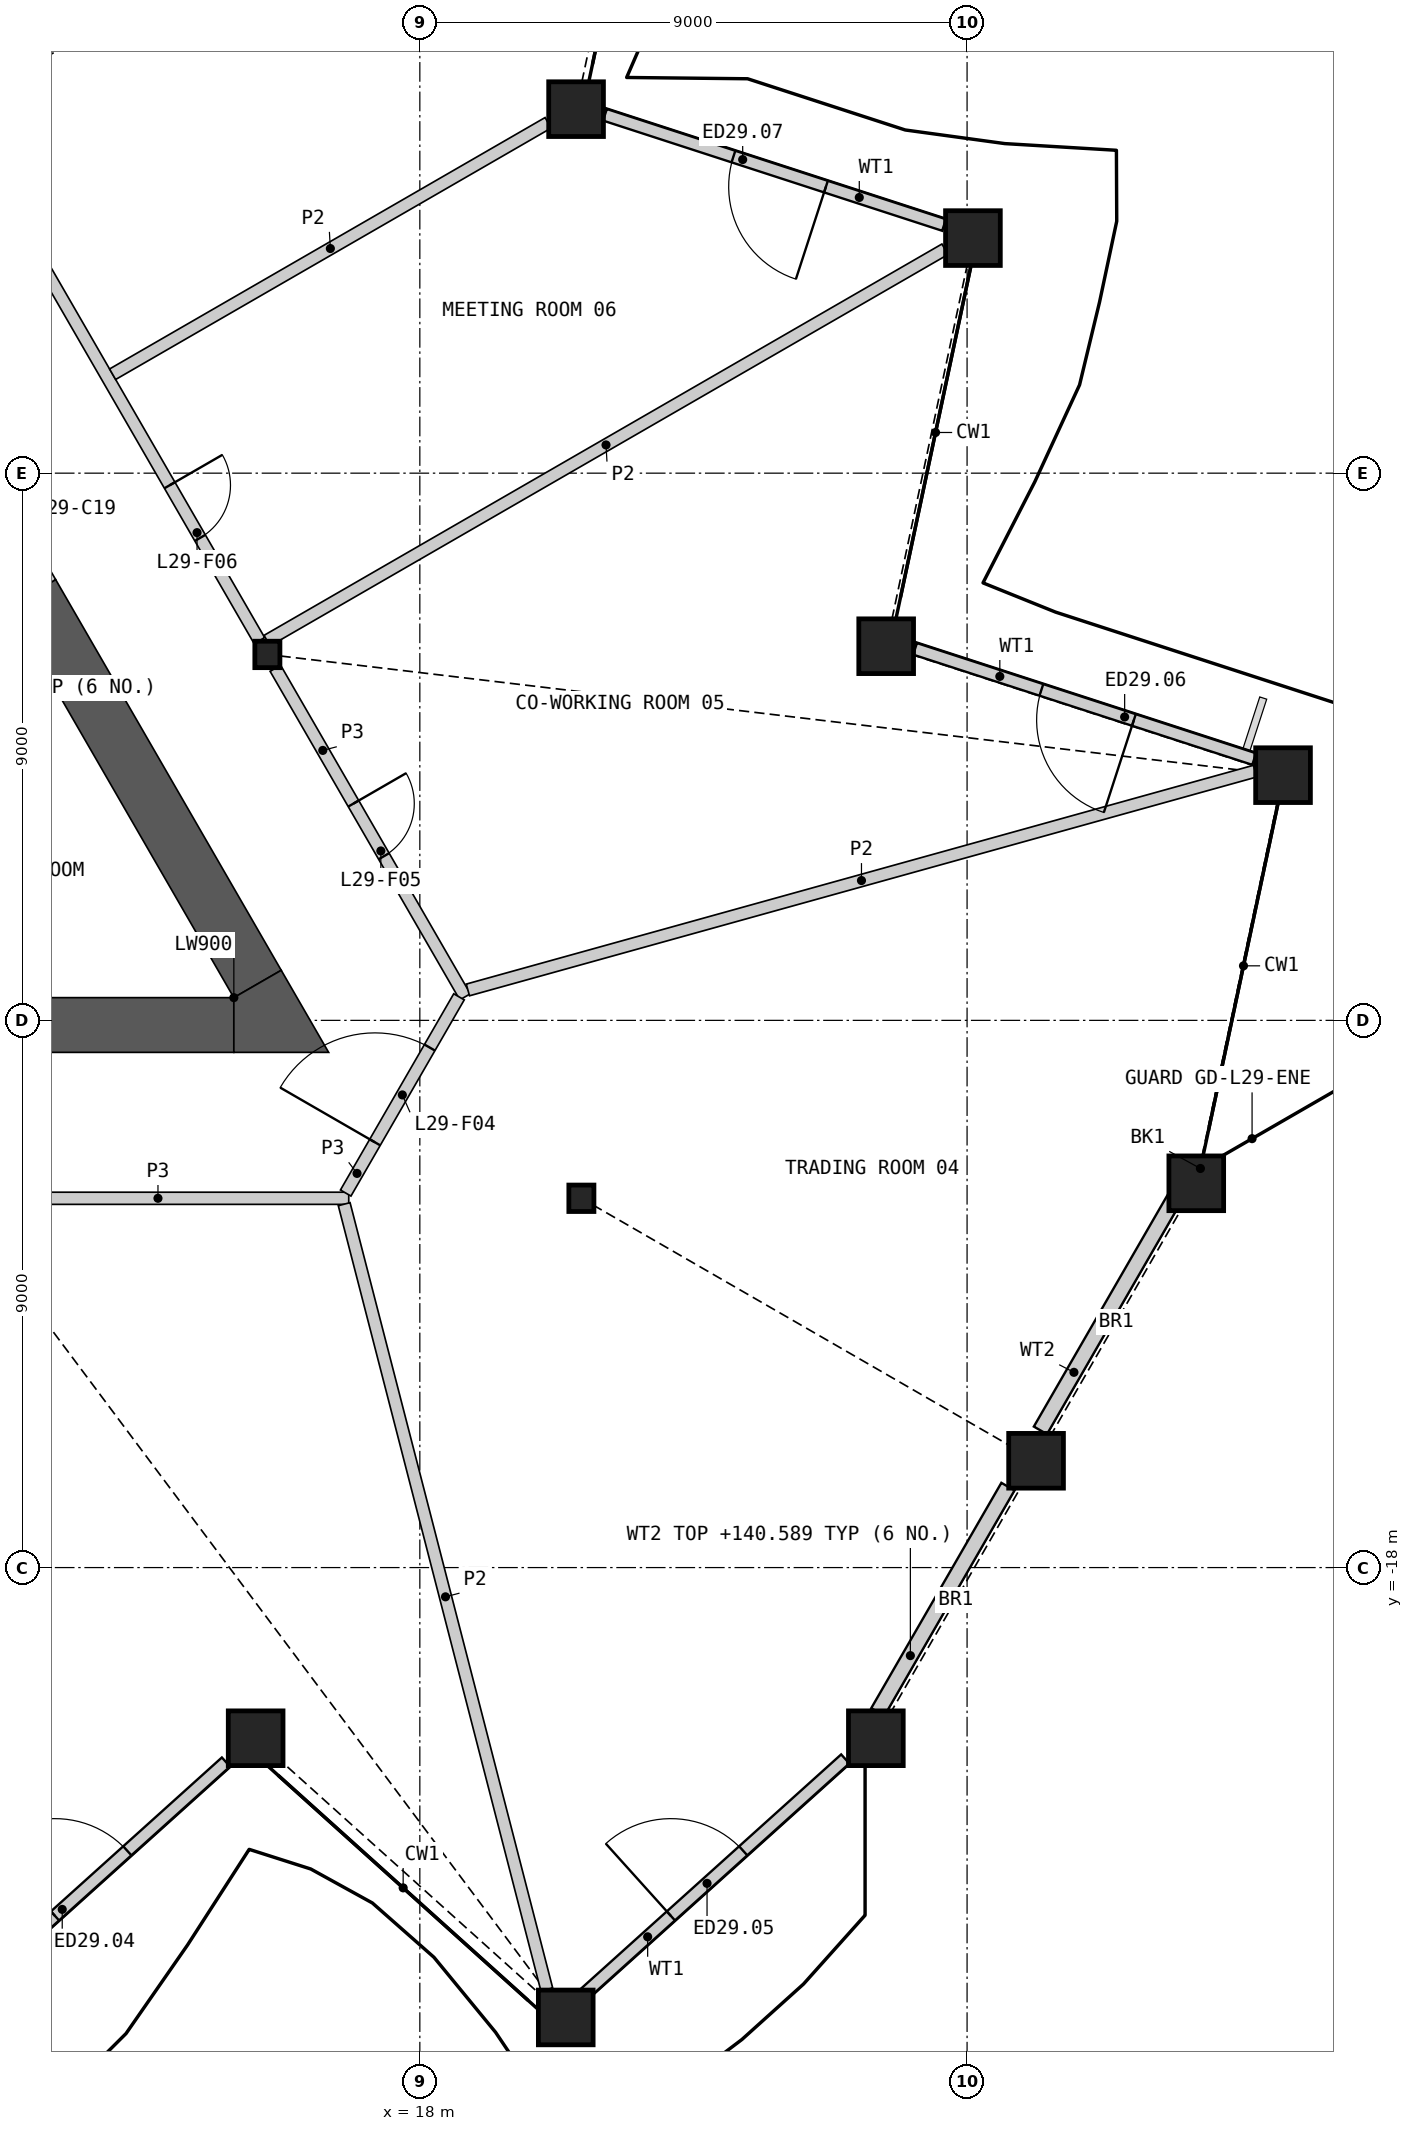
"""IFC4 building model, lengths in metres.
Left out: names, types, materials, properties, quantities, classifications, styles, units other than length and angle.
Written with IfcOpenShell. Run it as: python <this file> out.ifc"""

import sys

from ifc_helpers import new_model, si_unit, direction, frame, frame_2d, origin, origin_2d, place, context, subcontext, project, spatial, polyline, rectangle, hollow_rectangle, i_section, outline, extrude, element, fill, save


model = new_model("IFC4")
c1 = context("Model", 3, precision=1e-05, world=origin(), true_north=direction((0.0, 1.0)))
c2 = subcontext(c1, "Body", "Model", "MODEL_VIEW")
j1 = project(units=[si_unit("LENGTHUNIT", "METRE"), si_unit("PLANEANGLEUNIT", "RADIAN")], contexts=[c1])
p1 = place(None, origin())
s1 = spatial("IfcSite", under=j1, at=p1, CompositionType="ELEMENT")
p2 = place(p1, origin())
s2 = spatial("IfcBuilding", under=s1, at=p2, CompositionType="ELEMENT")
p3 = place(p2, frame((0.0, 0.0, 137.4)))
s3 = spatial("IfcBuildingStorey", under=s2, at=p3, CompositionType="ELEMENT", Elevation=137.4)
for number, where, z_axis, x_axis in (
    (1, (15.3, -20.807, 0.0), (0.0, 0.0, 1.0), (1.0, 0.0, 0.0)),
    (2, (20.4, -25.399, 0.0), (0.0, 0.0, 1.0), (1.0, 0.0, 0.0)),
    (3, (25.5, -20.807, 0.0), (0.0, 0.0, 1.0), (1.0, 0.0, 0.0)),
    (4, (28.135, -16.243, 0.0), (0.0, 0.0, 1.0), (1.0, 0.0, 0.0)),
    (5, (30.769, -11.68, 0.0), (0.0, 0.0, 1.0), (1.0, 0.0, 0.0)),
    (6, (32.196, -4.967, 0.0), (0.0, 0.0, 1.0), (1.0, 0.0, 0.0)),
    (7, (25.669, -2.846, 0.0), (0.0, 0.0, 1.0), (1.0, 0.0, 0.0)),
    (8, (27.096, 3.866, 0.0), (0.0, 0.0, 1.0), (1.0, 0.0, 0.0)),
    (9, (20.57, 5.987, 0.0), (0.0, 0.0, 1.0), (1.0, 0.0, 0.0)),
):
    element("IfcColumn", number, at=place(p3, frame(where, z_axis=z_axis, x_axis=x_axis)), inside=s3, PredefinedType="COLUMN", context=c2, shape_type="SweptSolid", body=[
        extrude(hollow_rectangle(XDim=0.9, YDim=0.9, WallThickness=0.06, at=origin_2d()), origin(), (0.0, 0.0, 1.0), 4.2),
    ])
for number, where, z_axis, x_axis in (
    (10, (20.657, -11.926, 0.0), (0.0, 0.0, 1.0), (1.0, 0.0, 0.0)),
    (11, (15.493, -2.982, 0.0), (0.0, 0.0, 1.0), (1.0, 0.0, 0.0)),
):
    element("IfcColumn", number, at=place(p3, frame(where, z_axis=z_axis, x_axis=x_axis)), inside=s3, PredefinedType="COLUMN", context=c2, shape_type="SweptSolid", body=[
        extrude(i_section(OverallWidth=0.412, OverallDepth=0.435, WebThickness=0.036, FlangeThickness=0.057, at=origin_2d()), origin(), (0.0, 0.0, 1.0), 4.2),
    ])
p4 = place(p3, frame((10.535, -25.048, 0.0), z_axis=(0.0, 0.0, 1.0), x_axis=(0.74315279225, 0.669121758256, 0.0)))
e12 = element("IfcWall", 12, at=p4, inside=s3, PredefinedType="SOLIDWALL", context=c2, shape_type="SweptSolid", body=[
    extrude(rectangle(XDim=5.755, YDim=0.2, at=frame_2d((2.877, 0.0))), origin(), (0.0, 0.0, 1.0), 3.189),
])
p5 = place(p4, frame((1.971, 0.0, 0.0)))
e13 = element("IfcOpeningElement", 13, at=p5, cuts=e12, PredefinedType="OPENING", context=c2, shape_type="SweptSolid", body=[
    extrude(rectangle(XDim=1.6, YDim=2.4, at=frame_2d((0.8, 1.2))), frame((0.0, 0.11, 0.0), z_axis=(0.0, -1.0, 0.0), x_axis=(1.0, 0.0, 0.0)), (0.0, 0.0, 1.0), 0.22),
])
p6 = place(p3, frame((20.664, -25.048, 0.0), z_axis=(0.0, 0.0, 1.0), x_axis=(0.743137948431, 0.669138244014, 0.0)))
e14 = element("IfcWall", 14, at=p6, inside=s3, PredefinedType="SOLIDWALL", context=c2, shape_type="SweptSolid", body=[
    extrude(rectangle(XDim=5.83, YDim=0.2, at=frame_2d((2.915, 0.0))), origin(), (0.0, 0.0, 1.0), 3.189),
])
p7 = place(p6, frame((1.971, 0.0, 0.0)))
e15 = element("IfcOpeningElement", 15, at=p7, cuts=e14, PredefinedType="OPENING", context=c2, shape_type="SweptSolid", body=[
    extrude(rectangle(XDim=1.6, YDim=2.4, at=frame_2d((0.8, 1.2))), frame((0.0, 0.11, 0.0), z_axis=(0.0, -1.0, 0.0), x_axis=(1.0, 0.0, 0.0)), (0.0, 0.0, 1.0), 0.22),
])
p8 = place(p3, frame((25.532, -20.375, 0.0), z_axis=(0.0, 0.0, 1.0), x_axis=(0.500010506321, 0.866019337872, 0.0)))
e16 = element("IfcWall", 16, at=p8, inside=s3, PredefinedType="SOLIDWALL", context=c2, shape_type="SweptSolid", body=[
    extrude(rectangle(XDim=4.28, YDim=0.25, at=frame_2d((2.14, 0.0))), origin(), (0.0, 0.0, 1.0), 3.189),
])
p9 = place(p3, frame((28.206, -15.743, 0.0), z_axis=(0.0, 0.0, 1.0), x_axis=(0.499979643272, 0.866037156428, 0.0)))
e17 = element("IfcWall", 17, at=p9, inside=s3, PredefinedType="SOLIDWALL", context=c2, shape_type="SweptSolid", body=[
    extrude(rectangle(XDim=4.41, YDim=0.25, at=frame_2d((2.205, 0.0))), origin(), (0.0, 0.0, 1.0), 3.189),
])
p10 = place(p3, frame((31.721, -4.702, 0.0), z_axis=(0.0, 0.0, 1.0), x_axis=(-0.951053952554, 0.309024884649, 0.0)))
e18 = element("IfcWall", 18, at=p10, inside=s3, PredefinedType="SOLIDWALL", context=c2, shape_type="SweptSolid", body=[
    extrude(rectangle(XDim=5.865, YDim=0.2, at=frame_2d((2.932, 0.0))), origin(), (0.0, 0.0, 1.0), 3.189),
])
p11 = place(p10, frame((2.08, 0.0, 0.0)))
e19 = element("IfcOpeningElement", 19, at=p11, cuts=e18, PredefinedType="OPENING", context=c2, shape_type="SweptSolid", body=[
    extrude(rectangle(XDim=1.6, YDim=2.4, at=frame_2d((0.8, 1.2))), frame((0.0, 0.11, 0.0), z_axis=(0.0, -1.0, 0.0), x_axis=(1.0, 0.0, 0.0)), (0.0, 0.0, 1.0), 0.22),
])
p12 = place(p3, frame((26.622, 4.082, 0.0), z_axis=(0.0, 0.0, 1.0), x_axis=(-0.951053952554, 0.309024884649, 0.0)))
e20 = element("IfcWall", 20, at=p12, inside=s3, PredefinedType="SOLIDWALL", context=c2, shape_type="SweptSolid", body=[
    extrude(rectangle(XDim=5.865, YDim=0.2, at=frame_2d((2.932, 0.0))), origin(), (0.0, 0.0, 1.0), 3.189),
])
p13 = place(p12, frame((2.042, 0.0, 0.0)))
e21 = element("IfcOpeningElement", 21, at=p13, cuts=e20, PredefinedType="OPENING", context=c2, shape_type="SweptSolid", body=[
    extrude(rectangle(XDim=1.6, YDim=2.4, at=frame_2d((0.8, 1.2))), frame((0.0, 0.11, 0.0), z_axis=(0.0, -1.0, 0.0), x_axis=(1.0, 0.0, 0.0)), (0.0, 0.0, 1.0), 0.22),
])
p14 = place(p3, frame((2.488, -9.076, 0.0), z_axis=(0.0, 0.0, 1.0), x_axis=(1.0, 0.0, 0.0)))
e22 = element("IfcWall", 22, at=p14, inside=s3, PredefinedType="SHEAR", context=c2, shape_type="SweptSolid", body=[
    extrude(rectangle(XDim=12.454, YDim=0.9, at=frame_2d((6.227, 0.0))), origin(), (0.0, 0.0, 1.0), 3.8),
])
p15 = place(p3, frame((15.331, -8.401, 0.0), z_axis=(0.0, 0.0, 1.0), x_axis=(-0.499985413531, 0.866033825122, 0.0)))
e23 = element("IfcWall", 23, at=p15, inside=s3, PredefinedType="SHEAR", context=c2, shape_type="SweptSolid", body=[
    extrude(rectangle(XDim=7.421, YDim=0.9, at=frame_2d((3.71, 0.0))), origin(), (0.0, 0.0, 1.0), 3.8),
])
p16 = place(p3, origin())
e24 = element("IfcWall", 24, at=p16, inside=s3, PredefinedType="SHEAR", context=c2, shape_type="SweptSolid", body=[
    extrude(outline(polyline([(14.941, -8.626), (15.721, -8.176), (16.5, -9.526), (14.941, -9.526), (14.941, -8.626)])), origin(), (0.0, 0.0, 1.0), 3.8),
])
p17 = place(p3, frame((11.621, -1.975, 0.0), z_axis=(0.0, 0.0, 1.0), x_axis=(-0.50002983664, 0.866008176907, 0.0)))
e25 = element("IfcWall", 25, at=p17, inside=s3, PredefinedType="SHEAR", context=c2, shape_type="SweptSolid", body=[
    extrude(rectangle(XDim=2.2, YDim=0.9, at=frame_2d((1.1, 0.0))), origin(), (0.0, 0.0, 1.0), 3.8),
])
p18 = place(p17, frame((0.6, 0.0, 0.0)))
e26 = element("IfcOpeningElement", 26, at=p18, cuts=e25, PredefinedType="OPENING", context=c2, shape_type="SweptSolid", body=[
    extrude(rectangle(XDim=1.0, YDim=2.1, at=frame_2d((0.5, 1.05))), frame((0.0, 0.46, 0.0), z_axis=(0.0, -1.0, 0.0), x_axis=(1.0, 0.0, 0.0)), (0.0, 0.0, 1.0), 0.92),
])
p19 = place(p3, frame((10.46, 5.736, 0.0), z_axis=(0.0, 0.0, 1.0), x_axis=(0.500004141693, -0.866023012564, 0.0)))
e27 = element("IfcWall", 27, at=p19, inside=s3, PredefinedType="PARTITIONING", context=c2, shape_type="SweptSolid", body=[
    extrude(rectangle(XDim=9.803, YDim=0.2, at=frame_2d((4.902, 0.0))), origin(), (0.0, 0.0, 1.0), 3.8),
])
p20 = place(p19, frame((6.853, 0.0, 0.0)))
e28 = element("IfcOpeningElement", 28, at=p20, cuts=e27, PredefinedType="OPENING", context=c2, shape_type="SweptSolid", body=[
    extrude(rectangle(XDim=1.0, YDim=2.1, at=frame_2d((0.5, 1.05))), frame((0.0, 0.11, 0.0), z_axis=(0.0, -1.0, 0.0), x_axis=(1.0, 0.0, 0.0)), (0.0, 0.0, 1.0), 0.22),
])
p21 = place(p3, frame((10.556, -11.926, 0.0), z_axis=(0.0, 0.0, 1.0), x_axis=(1.0, 0.0, 0.0)))
e29 = element("IfcWall", 29, at=p21, inside=s3, PredefinedType="PARTITIONING", context=c2, shape_type="SweptSolid", body=[
    extrude(rectangle(XDim=6.275, YDim=0.2, at=frame_2d((3.137, 0.0))), origin(), (0.0, 0.0, 1.0), 3.8),
])
p22 = place(p3, frame((15.624, -3.209, 0.0), z_axis=(0.0, 0.0, 1.0), x_axis=(0.499997920671, -0.866026604282, 0.0)))
e30 = element("IfcWall", 30, at=p22, inside=s3, PredefinedType="PARTITIONING", context=c2, shape_type="SweptSolid", body=[
    extrude(rectangle(XDim=6.24, YDim=0.2, at=frame_2d((3.12, 0.0))), origin(), (0.0, 0.0, 1.0), 3.8),
])
p23 = place(p22, frame((2.57, 0.0, 0.0)))
e31 = element("IfcOpeningElement", 31, at=p23, cuts=e30, PredefinedType="OPENING", context=c2, shape_type="SweptSolid", body=[
    extrude(rectangle(XDim=1.0, YDim=2.1, at=frame_2d((0.5, 1.05))), frame((0.0, 0.11, 0.0), z_axis=(0.0, -1.0, 0.0), x_axis=(1.0, 0.0, 0.0)), (0.0, 0.0, 1.0), 0.22),
])
p24 = place(p3, frame((16.781, -11.84, 0.0), z_axis=(0.0, 0.0, 1.0), x_axis=(0.499958791762, 0.866049194065, 0.0)))
e32 = element("IfcWall", 32, at=p24, inside=s3, PredefinedType="PARTITIONING", context=c2, shape_type="SweptSolid", body=[
    extrude(rectangle(XDim=3.726, YDim=0.2, at=frame_2d((1.863, 0.0))), origin(), (0.0, 0.0, 1.0), 3.8),
])
p25 = place(p24, frame((0.963, 0.0, 0.0)))
e33 = element("IfcOpeningElement", 33, at=p25, cuts=e32, PredefinedType="OPENING", context=c2, shape_type="SweptSolid", body=[
    extrude(rectangle(XDim=1.8, YDim=2.1, at=frame_2d((0.9, 1.05))), frame((0.0, 0.11, 0.0), z_axis=(0.0, -1.0, 0.0), x_axis=(1.0, 0.0, 0.0)), (0.0, 0.0, 1.0), 0.22),
])
p26 = place(p3, frame((18.79, -8.5, 0.0), z_axis=(0.0, 0.0, 1.0), x_axis=(0.963468434011, 0.267821912219, 0.0)))
e34 = element("IfcWall", 34, at=p26, inside=s3, PredefinedType="PARTITIONING", context=c2, shape_type="SweptSolid", body=[
    extrude(rectangle(XDim=13.437, YDim=0.2, at=frame_2d((6.718, 0.0))), origin(), (0.0, 0.0, 1.0), 2.885),
])
p27 = place(p3, frame((16.756, -12.023, 0.0), z_axis=(0.0, 0.0, 1.0), x_axis=(0.249815467428, -0.968293463901, 0.0)))
e35 = element("IfcWall", 35, at=p27, inside=s3, PredefinedType="PARTITIONING", context=c2, shape_type="SweptSolid", body=[
    extrude(rectangle(XDim=13.339, YDim=0.2, at=frame_2d((6.669, 0.0))), origin(), (0.0, 0.0, 1.0), 2.885),
])
p28 = place(p3, frame((15.488, -2.754, 0.0), z_axis=(0.0, 0.0, 1.0), x_axis=(0.866026411352, 0.499998254837, 0.0)))
e36 = element("IfcWall", 36, at=p28, inside=s3, PredefinedType="PARTITIONING", context=c2, shape_type="SweptSolid", body=[
    extrude(rectangle(XDim=12.873, YDim=0.2, at=frame_2d((6.437, 0.0))), origin(), (0.0, 0.0, 1.0), 2.885),
])
p29 = place(p3, frame((12.947, 1.627, 0.0), z_axis=(0.0, 0.0, 1.0), x_axis=(0.866034669089, 0.499983951678, 0.0)))
e37 = element("IfcWall", 37, at=p29, inside=s3, PredefinedType="PARTITIONING", context=c2, shape_type="SweptSolid", body=[
    extrude(rectangle(XDim=8.27, YDim=0.2, at=frame_2d((4.135, 0.0))), origin(), (0.0, 0.0, 1.0), 2.885),
])
p30 = place(p5, origin())
e38 = element("IfcDoor", 38, at=p30, inside=s3, OperationType="DOUBLE_DOOR_SINGLE_SWING", PredefinedType="DOOR", context=c2, shape_type="SweptSolid", body=[
    extrude(rectangle(XDim=1.6, YDim=2.4, at=frame_2d((0.8, 1.2))), frame((0.0, 0.025, 0.0), z_axis=(0.0, -1.0, 0.0), x_axis=(1.0, 0.0, 0.0)), (0.0, 0.0, 1.0), 0.05),
])
fill(e13, e38)
p31 = place(p7, origin())
e39 = element("IfcDoor", 39, at=p31, inside=s3, OperationType="DOUBLE_DOOR_SINGLE_SWING", PredefinedType="DOOR", context=c2, shape_type="SweptSolid", body=[
    extrude(rectangle(XDim=1.6, YDim=2.4, at=frame_2d((0.8, 1.2))), frame((0.0, 0.025, 0.0), z_axis=(0.0, -1.0, 0.0), x_axis=(1.0, 0.0, 0.0)), (0.0, 0.0, 1.0), 0.05),
])
fill(e15, e39)
p32 = place(p11, origin())
e40 = element("IfcDoor", 40, at=p32, inside=s3, OperationType="DOUBLE_DOOR_SINGLE_SWING", PredefinedType="DOOR", context=c2, shape_type="SweptSolid", body=[
    extrude(rectangle(XDim=1.6, YDim=2.4, at=frame_2d((0.8, 1.2))), frame((0.0, 0.025, 0.0), z_axis=(0.0, -1.0, 0.0), x_axis=(1.0, 0.0, 0.0)), (0.0, 0.0, 1.0), 0.05),
])
fill(e19, e40)
p33 = place(p13, origin())
e41 = element("IfcDoor", 41, at=p33, inside=s3, OperationType="DOUBLE_DOOR_SINGLE_SWING", PredefinedType="DOOR", context=c2, shape_type="SweptSolid", body=[
    extrude(rectangle(XDim=1.6, YDim=2.4, at=frame_2d((0.8, 1.2))), frame((0.0, 0.025, 0.0), z_axis=(0.0, -1.0, 0.0), x_axis=(1.0, 0.0, 0.0)), (0.0, 0.0, 1.0), 0.05),
])
fill(e21, e41)
p34 = place(p25, origin())
e42 = element("IfcDoor", 42, at=p34, inside=s3, OperationType="DOUBLE_DOOR_SINGLE_SWING", PredefinedType="DOOR", context=c2, shape_type="SweptSolid", body=[
    extrude(rectangle(XDim=1.8, YDim=2.1, at=frame_2d((0.9, 1.05))), frame((0.0, 0.025, 0.0), z_axis=(0.0, -1.0, 0.0), x_axis=(1.0, 0.0, 0.0)), (0.0, 0.0, 1.0), 0.05),
])
fill(e33, e42)
p35 = place(p23, origin())
e43 = element("IfcDoor", 43, at=p35, inside=s3, OperationType="SINGLE_SWING_LEFT", PredefinedType="DOOR", context=c2, shape_type="SweptSolid", body=[
    extrude(rectangle(XDim=1.0, YDim=2.1, at=frame_2d((0.5, 1.05))), frame((0.0, 0.025, 0.0), z_axis=(0.0, -1.0, 0.0), x_axis=(1.0, 0.0, 0.0)), (0.0, 0.0, 1.0), 0.05),
])
fill(e31, e43)
p36 = place(p20, origin())
e44 = element("IfcDoor", 44, at=p36, inside=s3, OperationType="SINGLE_SWING_LEFT", PredefinedType="DOOR", context=c2, shape_type="SweptSolid", body=[
    extrude(rectangle(XDim=1.0, YDim=2.1, at=frame_2d((0.5, 1.05))), frame((0.0, 0.025, 0.0), z_axis=(0.0, -1.0, 0.0), x_axis=(1.0, 0.0, 0.0)), (0.0, 0.0, 1.0), 0.05),
])
fill(e28, e44)
save(model, sys.argv[1])
